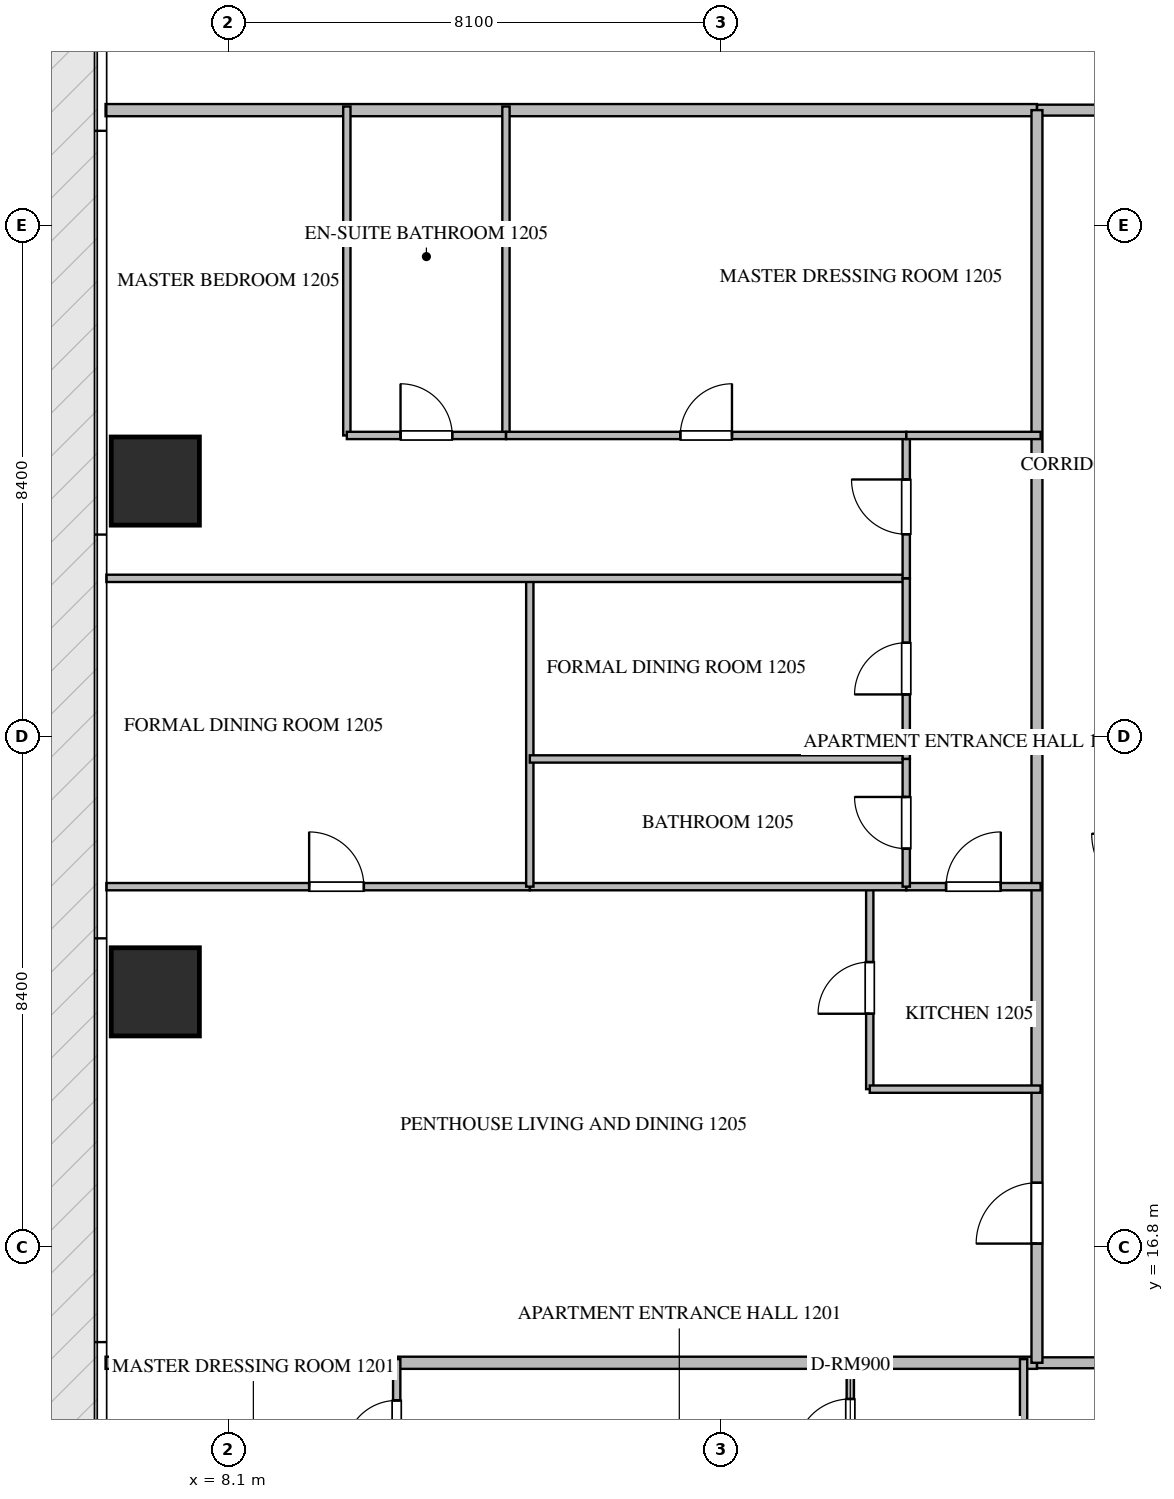
"""IFC4 building model, lengths in metres.
Left out: names, types, materials, properties, quantities, classifications, styles, units other than length and angle.
Written with IfcOpenShell. Run it as: python <this file> out.ifc"""

import sys

from ifc_helpers import new_model, si_unit, direction, frame, frame_2d, origin, origin_2d, place, context, subcontext, project, spatial, rectangle, extrude, source, transform, mapped, element, fill, save


model = new_model("IFC4")
c1 = context("Model", 3, precision=1e-05, world=origin(), true_north=direction((0.0, 1.0)))
c2 = subcontext(c1, "Body", "Model", "MODEL_VIEW")
j1 = project(units=[si_unit("LENGTHUNIT", "METRE"), si_unit("PLANEANGLEUNIT", "RADIAN")], contexts=[c1])
p1 = place(None, origin())
s1 = spatial("IfcSite", under=j1, at=p1, CompositionType="ELEMENT")
p2 = place(p1, origin())
s2 = spatial("IfcBuilding", under=s1, at=p2, CompositionType="ELEMENT")
p3 = place(p2, frame((0.0, 0.0, 52.95)))
s3 = spatial("IfcBuildingStorey", under=s2, at=p3, CompositionType="ELEMENT", Elevation=52.95)
m1 = source(origin(), c2, "Body", "SweptSolid", [
    extrude(rectangle(XDim=1.45, YDim=1.45, at=origin_2d()), origin(), (0.0, 0.0, 1.0), 3.75),
])
for number, where, z_axis, x_axis in (
    (1, (6.9, 21.0, -0.26), (0.0, 0.0, 1.0), (1.0, 0.0, 0.0)),
    (2, (6.9, 29.4, -0.26), (0.0, 0.0, 1.0), (1.0, 0.0, 0.0)),
):
    element("IfcColumn", number, at=place(p3, frame(where, z_axis=z_axis, x_axis=x_axis)), inside=s3, PredefinedType="COLUMN", context=c2, shape_type="MappedRepresentation", body=[
        mapped(m1, transform((0.0, 0.0, 0.0), scale=1.0)),
    ])
for number, where, z_axis, x_axis in (
    (3, (6.082, 14.9, 0.0), (0.0, 0.0, 1.0), (1.0, 0.0, 0.0)),
    (4, (6.082, 35.5, 0.0), (0.0, 0.0, 1.0), (1.0, 0.0, 0.0)),
):
    element("IfcWall", number, at=place(p3, frame(where, z_axis=z_axis, x_axis=x_axis)), inside=s3, PredefinedType="PARTITIONING", context=c2, shape_type="SweptSolid", body=[
        extrude(rectangle(XDim=15.318, YDim=0.2, at=frame_2d((7.659, 0.0))), origin(), (0.0, 0.0, 1.0), 3.49),
    ])
p4 = place(p3, frame((21.402, 14.9, 0.0), z_axis=(0.0, 0.0, 1.0), x_axis=(1.0, 0.0, 0.0)))
e5 = element("IfcWall", 5, at=p4, inside=s3, PredefinedType="PARTITIONING", context=c2, shape_type="SweptSolid", body=[
    extrude(rectangle(XDim=21.996, YDim=0.18, at=frame_2d((10.998, 0.0))), origin(), (0.0, 0.0, 1.0), 3.49),
])
p5 = place(p4, frame((2.1, 0.0, 0.0)))
e6 = element("IfcOpeningElement", 6, at=p5, cuts=e5, PredefinedType="OPENING", context=c2, shape_type="SweptSolid", body=[
    extrude(rectangle(XDim=1.0, YDim=2.15, at=frame_2d((0.5, 1.075))), frame((0.0, 0.1, 0.0), z_axis=(0.0, -1.0, 0.0), x_axis=(1.0, 0.0, 0.0)), (0.0, 0.0, 1.0), 0.2),
])
p6 = place(p4, frame((14.172, 0.0, 0.0)))
e7 = element("IfcOpeningElement", 7, at=p6, cuts=e5, PredefinedType="OPENING", context=c2, shape_type="SweptSolid", body=[
    extrude(rectangle(XDim=1.0, YDim=2.15, at=frame_2d((0.5, 1.075))), frame((0.0, 0.1, 0.0), z_axis=(0.0, -1.0, 0.0), x_axis=(1.0, 0.0, 0.0)), (0.0, 0.0, 1.0), 0.2),
])
p7 = place(p4, frame((18.896, 0.0, 0.0)))
e8 = element("IfcOpeningElement", 8, at=p7, cuts=e5, PredefinedType="OPENING", context=c2, shape_type="SweptSolid", body=[
    extrude(rectangle(XDim=1.0, YDim=2.15, at=frame_2d((0.5, 1.075))), frame((0.0, 0.1, 0.0), z_axis=(0.0, -1.0, 0.0), x_axis=(1.0, 0.0, 0.0)), (0.0, 0.0, 1.0), 0.2),
])
p8 = place(p3, frame((21.402, 35.5, 0.0), z_axis=(0.0, 0.0, 1.0), x_axis=(1.0, 0.0, 0.0)))
e9 = element("IfcWall", 9, at=p8, inside=s3, PredefinedType="PARTITIONING", context=c2, shape_type="SweptSolid", body=[
    extrude(rectangle(XDim=21.996, YDim=0.18, at=frame_2d((10.998, 0.0))), origin(), (0.0, 0.0, 1.0), 3.49),
])
p9 = place(p8, frame((15.222, 0.0, 0.0)))
e10 = element("IfcOpeningElement", 10, at=p9, cuts=e9, PredefinedType="OPENING", context=c2, shape_type="SweptSolid", body=[
    extrude(rectangle(XDim=1.0, YDim=2.15, at=frame_2d((0.5, 1.075))), frame((0.0, 0.1, 0.0), z_axis=(0.0, -1.0, 0.0), x_axis=(1.0, 0.0, 0.0)), (0.0, 0.0, 1.0), 0.2),
])
p10 = place(p3, frame((21.4, 14.9, 0.0), z_axis=(0.0, 0.0, 1.0), x_axis=(0.0, 1.0, 0.0)))
e11 = element("IfcWall", 11, at=p10, inside=s3, PredefinedType="PARTITIONING", context=c2, shape_type="SweptSolid", body=[
    extrude(rectangle(XDim=20.6, YDim=0.18, at=frame_2d((10.3, 0.0))), origin(), (0.0, 0.0, 1.0), 3.49),
])
p11 = place(p10, frame((1.96, 0.0, 0.0)))
e12 = element("IfcOpeningElement", 12, at=p11, cuts=e11, PredefinedType="OPENING", context=c2, shape_type="SweptSolid", body=[
    extrude(rectangle(XDim=1.0, YDim=2.15, at=frame_2d((0.5, 1.075))), frame((0.0, 0.1, 0.0), z_axis=(0.0, -1.0, 0.0), x_axis=(1.0, 0.0, 0.0)), (0.0, 0.0, 1.0), 0.2),
])
p12 = place(p3, frame((21.18, 12.15, 0.0), z_axis=(0.0, 0.0, 1.0), x_axis=(0.0, 1.0, 0.0)))
e13 = element("IfcWall", 13, at=p12, inside=s3, PredefinedType="PARTITIONING", context=c2, shape_type="SweptSolid", body=[
    extrude(rectangle(XDim=2.81, YDim=0.12, at=frame_2d((1.405, 0.0))), origin(), (0.0, 0.0, 1.0), 3.49),
])
p13 = place(p3, frame((18.33, 12.75, 0.0), z_axis=(0.0, 0.0, 1.0), x_axis=(0.0, 1.0, 0.0)))
e14 = element("IfcWall", 14, at=p13, inside=s3, PredefinedType="PARTITIONING", context=c2, shape_type="SweptSolid", body=[
    extrude(rectangle(XDim=2.21, YDim=0.12, at=frame_2d((1.105, 0.0))), origin(), (0.0, 0.0, 1.0), 3.49),
])
p14 = place(p13, frame((0.655, 0.0, 0.0)))
e15 = element("IfcOpeningElement", 15, at=p14, cuts=e14, PredefinedType="OPENING", context=c2, shape_type="SweptSolid", body=[
    extrude(rectangle(XDim=0.9, YDim=2.1, at=frame_2d((0.45, 1.05))), frame((0.0, 0.07, 0.0), z_axis=(0.0, -1.0, 0.0), x_axis=(1.0, 0.0, 0.0)), (0.0, 0.0, 1.0), 0.14),
])
p15 = place(p3, frame((10.87, 12.752, 0.0), z_axis=(0.0, 0.0, 1.0), x_axis=(0.0, 1.0, 0.0)))
e16 = element("IfcWall", 16, at=p15, inside=s3, PredefinedType="PARTITIONING", context=c2, shape_type="SweptSolid", body=[
    extrude(rectangle(XDim=2.208, YDim=0.12, at=frame_2d((1.104, 0.0))), origin(), (0.0, 0.0, 1.0), 3.49),
])
p16 = place(p15, frame((0.679, 0.0, 0.0)))
e17 = element("IfcOpeningElement", 17, at=p16, cuts=e16, PredefinedType="OPENING", context=c2, shape_type="SweptSolid", body=[
    extrude(rectangle(XDim=0.85, YDim=2.1, at=frame_2d((0.425, 1.05))), frame((0.0, 0.07, 0.0), z_axis=(0.0, -1.0, 0.0), x_axis=(1.0, 0.0, 0.0)), (0.0, 0.0, 1.0), 0.14),
])
p17 = place(p3, frame((18.65, 19.4, 0.0), z_axis=(0.0, 0.0, 1.0), x_axis=(0.0, 1.0, 0.0)))
e18 = element("IfcWall", 18, at=p17, inside=s3, PredefinedType="PARTITIONING", context=c2, shape_type="SweptSolid", body=[
    extrude(rectangle(XDim=3.33, YDim=0.12, at=frame_2d((1.665, 0.0))), origin(), (0.0, 0.0, 1.0), 3.49),
])
p18 = place(p17, frame((1.24, 0.0, 0.0)))
e19 = element("IfcOpeningElement", 19, at=p18, cuts=e18, PredefinedType="OPENING", context=c2, shape_type="SweptSolid", body=[
    extrude(rectangle(XDim=0.85, YDim=2.1, at=frame_2d((0.425, 1.05))), frame((0.0, 0.07, 0.0), z_axis=(0.0, -1.0, 0.0), x_axis=(1.0, 0.0, 0.0)), (0.0, 0.0, 1.0), 0.14),
])
p19 = place(p3, frame((18.65, 19.4, 0.0), z_axis=(0.0, 0.0, 1.0), x_axis=(1.0, 0.0, 0.0)))
e20 = element("IfcWall", 20, at=p19, inside=s3, PredefinedType="PARTITIONING", context=c2, shape_type="SweptSolid", body=[
    extrude(rectangle(XDim=2.81, YDim=0.12, at=frame_2d((1.405, 0.0))), origin(), (0.0, 0.0, 1.0), 3.49),
])
p20 = place(p3, frame((19.25, 22.73, 0.0), z_axis=(0.0, 0.0, 1.0), x_axis=(1.0, 0.0, 0.0)))
e21 = element("IfcWall", 21, at=p20, inside=s3, PredefinedType="PARTITIONING", context=c2, shape_type="SweptSolid", body=[
    extrude(rectangle(XDim=2.21, YDim=0.12, at=frame_2d((1.105, 0.0))), origin(), (0.0, 0.0, 1.0), 3.49),
])
p21 = place(p20, frame((0.655, 0.0, 0.0)))
e22 = element("IfcOpeningElement", 22, at=p21, cuts=e21, PredefinedType="OPENING", context=c2, shape_type="SweptSolid", body=[
    extrude(rectangle(XDim=0.9, YDim=2.1, at=frame_2d((0.45, 1.05))), frame((0.0, 0.07, 0.0), z_axis=(0.0, -1.0, 0.0), x_axis=(1.0, 0.0, 0.0)), (0.0, 0.0, 1.0), 0.14),
])
p22 = place(p3, frame((6.095, 22.73, 0.0), z_axis=(0.0, 0.0, 1.0), x_axis=(1.0, 0.0, 0.0)))
e23 = element("IfcWall", 23, at=p22, inside=s3, PredefinedType="PARTITIONING", context=c2, shape_type="SweptSolid", body=[
    extrude(rectangle(XDim=6.964, YDim=0.12, at=frame_2d((3.482, 0.0))), origin(), (0.0, 0.0, 1.0), 3.49),
])
p23 = place(p22, frame((3.335, 0.0, 0.0)))
e24 = element("IfcOpeningElement", 24, at=p23, cuts=e23, PredefinedType="OPENING", context=c2, shape_type="SweptSolid", body=[
    extrude(rectangle(XDim=0.9, YDim=2.1, at=frame_2d((0.45, 1.05))), frame((0.0, 0.07, 0.0), z_axis=(0.0, -1.0, 0.0), x_axis=(1.0, 0.0, 0.0)), (0.0, 0.0, 1.0), 0.14),
])
p24 = place(p3, frame((13.061, 22.73, 0.0), z_axis=(0.0, 0.0, 1.0), x_axis=(1.0, 0.0, 0.0)))
e25 = element("IfcWall", 25, at=p24, inside=s3, PredefinedType="PARTITIONING", context=c2, shape_type="SweptSolid", body=[
    extrude(rectangle(XDim=6.187, YDim=0.12, at=frame_2d((3.094, 0.0))), origin(), (0.0, 0.0, 1.0), 3.49),
])
p25 = place(p3, frame((13.059, 22.73, 0.0), z_axis=(0.0, 0.0, 1.0), x_axis=(0.0, 1.0, 0.0)))
e26 = element("IfcWall", 26, at=p25, inside=s3, PredefinedType="PARTITIONING", context=c2, shape_type="SweptSolid", body=[
    extrude(rectangle(XDim=5.07, YDim=0.12, at=frame_2d((2.535, 0.0))), origin(), (0.0, 0.0, 1.0), 3.49),
])
p26 = place(p3, frame((6.095, 27.8, 0.0), z_axis=(0.0, 0.0, 1.0), x_axis=(1.0, 0.0, 0.0)))
e27 = element("IfcWall", 27, at=p26, inside=s3, PredefinedType="PARTITIONING", context=c2, shape_type="SweptSolid", body=[
    extrude(rectangle(XDim=13.155, YDim=0.12, at=frame_2d((6.578, 0.0))), origin(), (0.0, 0.0, 1.0), 3.49),
])
p27 = place(p3, frame((13.059, 24.83, 0.0), z_axis=(0.0, 0.0, 1.0), x_axis=(1.0, 0.0, 0.0)))
e28 = element("IfcWall", 28, at=p27, inside=s3, PredefinedType="PARTITIONING", context=c2, shape_type="SweptSolid", body=[
    extrude(rectangle(XDim=6.191, YDim=0.12, at=frame_2d((3.095, 0.0))), origin(), (0.0, 0.0, 1.0), 3.49),
])
p28 = place(p3, frame((19.25, 22.73, 0.0), z_axis=(0.0, 0.0, 1.0), x_axis=(0.0, 1.0, 0.0)))
e29 = element("IfcWall", 29, at=p28, inside=s3, PredefinedType="PARTITIONING", context=c2, shape_type="SweptSolid", body=[
    extrude(rectangle(XDim=2.1, YDim=0.12, at=frame_2d((1.05, 0.0))), origin(), (0.0, 0.0, 1.0), 3.49),
])
p29 = place(p28, frame((0.625, 0.0, 0.0)))
e30 = element("IfcOpeningElement", 30, at=p29, cuts=e29, PredefinedType="OPENING", context=c2, shape_type="SweptSolid", body=[
    extrude(rectangle(XDim=0.85, YDim=2.1, at=frame_2d((0.425, 1.05))), frame((0.0, 0.07, 0.0), z_axis=(0.0, -1.0, 0.0), x_axis=(1.0, 0.0, 0.0)), (0.0, 0.0, 1.0), 0.14),
])
p30 = place(p3, frame((19.25, 24.832, 0.0), z_axis=(0.0, 0.0, 1.0), x_axis=(0.0, 1.0, 0.0)))
e31 = element("IfcWall", 31, at=p30, inside=s3, PredefinedType="PARTITIONING", context=c2, shape_type="SweptSolid", body=[
    extrude(rectangle(XDim=2.968, YDim=0.12, at=frame_2d((1.484, 0.0))), origin(), (0.0, 0.0, 1.0), 3.49),
])
p31 = place(p30, frame((1.059, 0.0, 0.0)))
e32 = element("IfcOpeningElement", 32, at=p31, cuts=e31, PredefinedType="OPENING", context=c2, shape_type="SweptSolid", body=[
    extrude(rectangle(XDim=0.85, YDim=2.1, at=frame_2d((0.425, 1.05))), frame((0.0, 0.07, 0.0), z_axis=(0.0, -1.0, 0.0), x_axis=(1.0, 0.0, 0.0)), (0.0, 0.0, 1.0), 0.14),
])
p32 = place(p3, frame((19.25, 27.802, 0.0), z_axis=(0.0, 0.0, 1.0), x_axis=(0.0, 1.0, 0.0)))
e33 = element("IfcWall", 33, at=p32, inside=s3, PredefinedType="PARTITIONING", context=c2, shape_type="SweptSolid", body=[
    extrude(rectangle(XDim=2.348, YDim=0.12, at=frame_2d((1.174, 0.0))), origin(), (0.0, 0.0, 1.0), 3.49),
])
p33 = place(p32, frame((0.724, 0.0, 0.0)))
e34 = element("IfcOpeningElement", 34, at=p33, cuts=e33, PredefinedType="OPENING", context=c2, shape_type="SweptSolid", body=[
    extrude(rectangle(XDim=0.9, YDim=2.1, at=frame_2d((0.45, 1.05))), frame((0.0, 0.07, 0.0), z_axis=(0.0, -1.0, 0.0), x_axis=(1.0, 0.0, 0.0)), (0.0, 0.0, 1.0), 0.14),
])
for number, where, z_axis, x_axis in (
    (35, (10.05, 30.15, 0.0), (0.0, 0.0, 1.0), (0.0, 1.0, 0.0)),
    (36, (12.667, 30.15, 0.0), (0.0, 0.0, 1.0), (0.0, 1.0, 0.0)),
):
    element("IfcWall", number, at=place(p3, frame(where, z_axis=z_axis, x_axis=x_axis)), inside=s3, PredefinedType="PARTITIONING", context=c2, shape_type="SweptSolid", body=[
        extrude(rectangle(XDim=5.41, YDim=0.12, at=frame_2d((2.705, 0.0))), origin(), (0.0, 0.0, 1.0), 3.49),
    ])
p34 = place(p3, frame((10.05, 30.15, 0.0), z_axis=(0.0, 0.0, 1.0), x_axis=(1.0, 0.0, 0.0)))
e37 = element("IfcWall", 37, at=p34, inside=s3, PredefinedType="PARTITIONING", context=c2, shape_type="SweptSolid", body=[
    extrude(rectangle(XDim=2.617, YDim=0.12, at=frame_2d((1.309, 0.0))), origin(), (0.0, 0.0, 1.0), 3.49),
])
p35 = place(p34, frame((0.883, 0.0, 0.0)))
e38 = element("IfcOpeningElement", 38, at=p35, cuts=e37, PredefinedType="OPENING", context=c2, shape_type="SweptSolid", body=[
    extrude(rectangle(XDim=0.85, YDim=2.1, at=frame_2d((0.425, 1.05))), frame((0.0, 0.07, 0.0), z_axis=(0.0, -1.0, 0.0), x_axis=(1.0, 0.0, 0.0)), (0.0, 0.0, 1.0), 0.14),
])
p36 = place(p3, frame((12.669, 30.15, 0.0), z_axis=(0.0, 0.0, 1.0), x_axis=(1.0, 0.0, 0.0)))
e39 = element("IfcWall", 39, at=p36, inside=s3, PredefinedType="PARTITIONING", context=c2, shape_type="SweptSolid", body=[
    extrude(rectangle(XDim=6.581, YDim=0.12, at=frame_2d((3.291, 0.0))), origin(), (0.0, 0.0, 1.0), 3.49),
])
p37 = place(p36, frame((2.865, 0.0, 0.0)))
e40 = element("IfcOpeningElement", 40, at=p37, cuts=e39, PredefinedType="OPENING", context=c2, shape_type="SweptSolid", body=[
    extrude(rectangle(XDim=0.85, YDim=2.1, at=frame_2d((0.425, 1.05))), frame((0.0, 0.07, 0.0), z_axis=(0.0, -1.0, 0.0), x_axis=(1.0, 0.0, 0.0)), (0.0, 0.0, 1.0), 0.14),
])
p38 = place(p3, frame((19.252, 30.15, 0.0), z_axis=(0.0, 0.0, 1.0), x_axis=(1.0, 0.0, 0.0)))
e41 = element("IfcWall", 41, at=p38, inside=s3, PredefinedType="PARTITIONING", context=c2, shape_type="SweptSolid", body=[
    extrude(rectangle(XDim=2.208, YDim=0.12, at=frame_2d((1.104, 0.0))), origin(), (0.0, 0.0, 1.0), 3.49),
])
m2 = source(origin(), c2, "Body", "SweptSolid", [
    extrude(rectangle(XDim=1.0, YDim=2.15, at=frame_2d((0.5, 1.075))), frame((0.0, 0.025, 0.0), z_axis=(0.0, -1.0, 0.0), x_axis=(1.0, 0.0, 0.0)), (0.0, 0.0, 1.0), 0.05),
])
p39 = place(p11, origin())
e42 = element("IfcDoor", 42, at=p39, inside=s3, OperationType="SINGLE_SWING_LEFT", PredefinedType="DOOR", context=c2, shape_type="MappedRepresentation", body=[
    mapped(m2, transform((0.0, 0.0, 0.0), scale=1.0)),
])
fill(e12, e42)
m3 = source(origin(), c2, "Body", "SweptSolid", [
    extrude(rectangle(XDim=0.9, YDim=2.1, at=frame_2d((0.45, 1.05))), frame((0.0, 0.025, 0.0), z_axis=(0.0, -1.0, 0.0), x_axis=(1.0, 0.0, 0.0)), (0.0, 0.0, 1.0), 0.05),
])
p40 = place(p14, origin())
e43 = element("IfcDoor", 43, at=p40, inside=s3, OperationType="SINGLE_SWING_LEFT", PredefinedType="DOOR", context=c2, shape_type="MappedRepresentation", body=[
    mapped(m3, transform((0.0, 0.0, 0.0), scale=1.0)),
])
fill(e15, e43)
m4 = source(origin(), c2, "Body", "SweptSolid", [
    extrude(rectangle(XDim=0.85, YDim=2.1, at=frame_2d((0.425, 1.05))), frame((0.0, 0.025, 0.0), z_axis=(0.0, -1.0, 0.0), x_axis=(1.0, 0.0, 0.0)), (0.0, 0.0, 1.0), 0.05),
])
p41 = place(p16, origin())
e44 = element("IfcDoor", 44, at=p41, inside=s3, OperationType="SINGLE_SWING_LEFT", PredefinedType="DOOR", context=c2, shape_type="MappedRepresentation", body=[
    mapped(m4, transform((0.0, 0.0, 0.0), scale=1.0)),
])
fill(e17, e44)
p42 = place(p18, origin())
e45 = element("IfcDoor", 45, at=p42, inside=s3, OperationType="SINGLE_SWING_LEFT", PredefinedType="DOOR", context=c2, shape_type="MappedRepresentation", body=[
    mapped(m4, transform((0.0, 0.0, 0.0), scale=1.0)),
])
fill(e19, e45)
p43 = place(p21, origin())
e46 = element("IfcDoor", 46, at=p43, inside=s3, OperationType="SINGLE_SWING_RIGHT", PredefinedType="DOOR", context=c2, shape_type="MappedRepresentation", body=[
    mapped(m3, transform((0.0, 0.0, 0.0), scale=1.0)),
])
fill(e22, e46)
p44 = place(p23, origin())
e47 = element("IfcDoor", 47, at=p44, inside=s3, OperationType="SINGLE_SWING_LEFT", PredefinedType="DOOR", context=c2, shape_type="MappedRepresentation", body=[
    mapped(m3, transform((0.0, 0.0, 0.0), scale=1.0)),
])
fill(e24, e47)
p45 = place(p29, origin())
e48 = element("IfcDoor", 48, at=p45, inside=s3, OperationType="SINGLE_SWING_RIGHT", PredefinedType="DOOR", context=c2, shape_type="MappedRepresentation", body=[
    mapped(m4, transform((0.0, 0.0, 0.0), scale=1.0)),
])
fill(e30, e48)
p46 = place(p31, origin())
e49 = element("IfcDoor", 49, at=p46, inside=s3, OperationType="SINGLE_SWING_LEFT", PredefinedType="DOOR", context=c2, shape_type="MappedRepresentation", body=[
    mapped(m4, transform((0.0, 0.0, 0.0), scale=1.0)),
])
fill(e32, e49)
p47 = place(p33, origin())
e50 = element("IfcDoor", 50, at=p47, inside=s3, OperationType="SINGLE_SWING_RIGHT", PredefinedType="DOOR", context=c2, shape_type="MappedRepresentation", body=[
    mapped(m3, transform((0.0, 0.0, 0.0), scale=1.0)),
])
fill(e34, e50)
p48 = place(p35, origin())
e51 = element("IfcDoor", 51, at=p48, inside=s3, OperationType="SINGLE_SWING_LEFT", PredefinedType="DOOR", context=c2, shape_type="MappedRepresentation", body=[
    mapped(m4, transform((0.0, 0.0, 0.0), scale=1.0)),
])
fill(e38, e51)
p49 = place(p37, origin())
e52 = element("IfcDoor", 52, at=p49, inside=s3, OperationType="SINGLE_SWING_RIGHT", PredefinedType="DOOR", context=c2, shape_type="MappedRepresentation", body=[
    mapped(m4, transform((0.0, 0.0, 0.0), scale=1.0)),
])
fill(e40, e52)
save(model, sys.argv[1])
